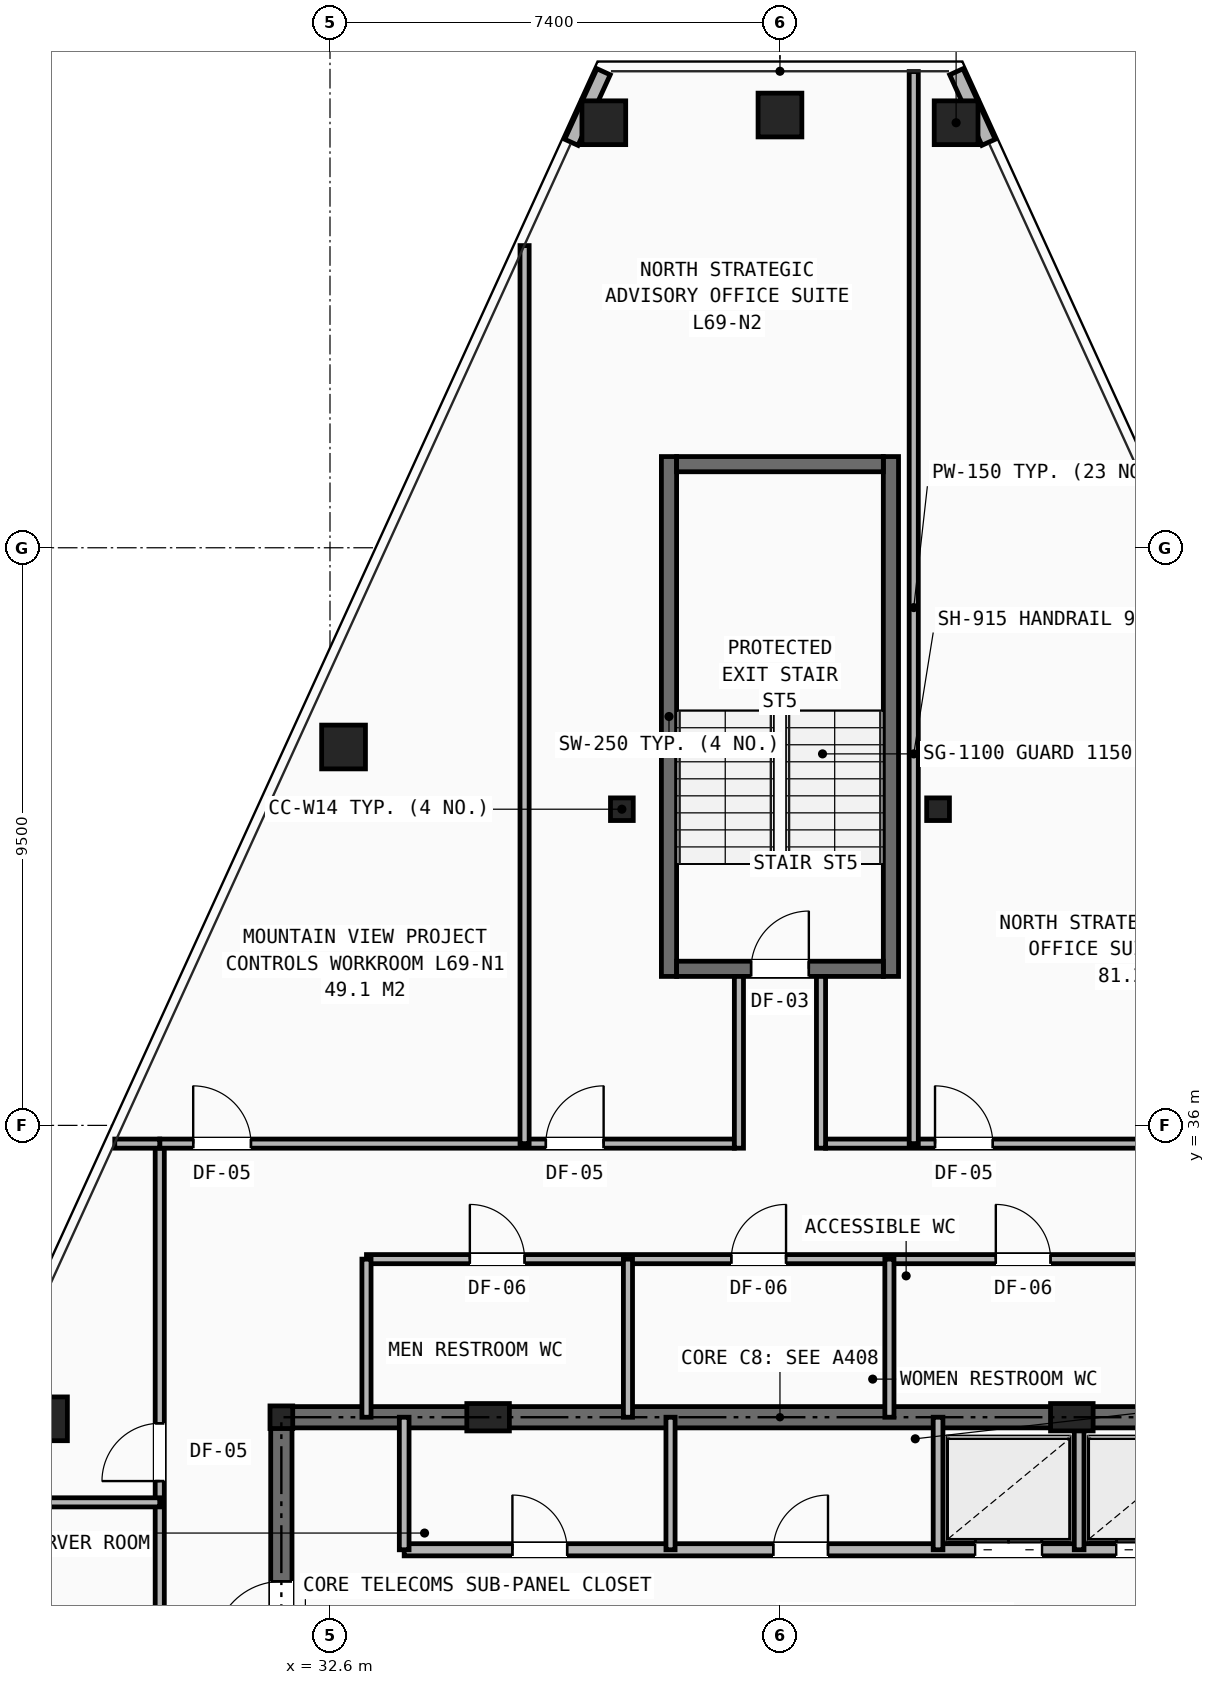
"""IFC4 building model, lengths in metres.
Left out: names, types, materials, properties, quantities, classifications, styles, units other than length and angle.
Written with IfcOpenShell. Run it as: python <this file> out.ifc"""

import sys

from ifc_helpers import new_model, si_unit, direction, frame, frame_2d, origin, origin_2d, place, context, subcontext, project, spatial, rectangle, hollow_rectangle, i_section, extrude, element, fill, save


model = new_model("IFC4")
c1 = context("Model", 3, precision=1e-05, world=origin(), true_north=direction((0.0, 1.0)))
c2 = subcontext(c1, "Body", "Model", "MODEL_VIEW")
j1 = project(units=[si_unit("LENGTHUNIT", "METRE"), si_unit("PLANEANGLEUNIT", "RADIAN")], contexts=[c1])
p1 = place(None, origin())
s1 = spatial("IfcSite", under=j1, at=p1, CompositionType="ELEMENT")
p2 = place(p1, origin())
s2 = spatial("IfcBuilding", under=s1, at=p2, CompositionType="ELEMENT")
p3 = place(p2, frame((0.0, 0.0, 243.4)))
s3 = spatial("IfcBuildingStorey", under=s2, at=p3, CompositionType="ELEMENT", Elevation=243.4)
for number, where, z_axis, x_axis in (
    (1, (31.8, 31.2, 0.0), (0.0, 0.0, 1.0), (1.0, 0.0, 0.0)),
    (2, (37.4, 41.2, 0.0), (0.0, 0.0, 1.0), (1.0, 0.0, 0.0)),
    (3, (42.6, 41.2, 0.0), (0.0, 0.0, 1.0), (1.0, 0.0, 0.0)),
):
    element("IfcColumn", number, at=place(p3, frame(where, z_axis=z_axis, x_axis=x_axis)), inside=s3, PredefinedType="COLUMN", context=c2, shape_type="SweptSolid", body=[
        extrude(i_section(OverallWidth=0.374, OverallDepth=0.372, WebThickness=0.016, FlangeThickness=0.026, at=origin_2d()), origin(), (0.0, 0.0, 1.0), 3.5),
    ])
for number, where, z_axis, x_axis in (
    (4, (35.2, 31.2, 0.0), (0.0, 0.0, 1.0), (1.0, 0.0, 0.0)),
    (5, (44.8, 31.2, 0.0), (0.0, 0.0, 1.0), (1.0, 0.0, 0.0)),
):
    element("IfcColumn", number, at=place(p3, frame(where, z_axis=z_axis, x_axis=x_axis)), inside=s3, PredefinedType="PILASTER", context=c2, shape_type="SweptSolid", body=[
        extrude(rectangle(XDim=0.7, YDim=0.45, at=origin_2d()), origin(), (0.0, 0.0, 1.0), 3.5),
    ])
for number, where, z_axis, x_axis in (
    (6, (42.897, 52.49, 0.0), (0.0, 0.0, 1.0), (1.0, 0.0, 0.0)),
    (7, (40.0, 52.617, 0.0), (0.0, 0.0, 1.0), (1.0, 0.0, 0.0)),
    (8, (37.103, 52.49, 0.0), (0.0, 0.0, 1.0), (1.0, 0.0, 0.0)),
    (9, (32.823, 42.223, 0.0), (0.0, 0.0, 1.0), (1.0, 0.0, 0.0)),
    (10, (27.921, 31.174, 0.0), (0.0, 0.0, 1.0), (1.0, 0.0, 0.0)),
):
    element("IfcColumn", number, at=place(p3, frame(where, z_axis=z_axis, x_axis=x_axis)), inside=s3, PredefinedType="COLUMN", context=c2, shape_type="SweptSolid", body=[
        extrude(hollow_rectangle(XDim=0.72, YDim=0.72, WallThickness=0.05, at=origin_2d()), origin(), (0.0, 0.0, 1.0), 3.5),
    ])
for number, where, z_axis, x_axis in (
    (11, (37.099, 53.329, 0.0), (0.0, 0.0, 1.0), (-0.415, -0.91, 0.0)),
    (12, (43.43, 52.168, 0.0), (0.0, 0.0, 1.0), (-0.415, 0.91, 0.0)),
):
    element("IfcWall", number, at=place(p3, frame(where, z_axis=z_axis, x_axis=x_axis)), inside=s3, PredefinedType="SHEAR", context=c2, shape_type="SweptSolid", body=[
        extrude(rectangle(XDim=1.276, YDim=0.24, at=frame_2d((0.638, 0.0))), origin(), (0.0, 0.0, 1.0), 2.623),
    ])
p4 = place(p3, frame((31.8, 31.2, 0.0), z_axis=(0.0, 0.0, 1.0), x_axis=(1.0, 0.0, 0.0)))
e13 = element("IfcWall", 13, at=p4, inside=s3, PredefinedType="SHEAR", context=c2, shape_type="SweptSolid", body=[
    extrude(rectangle(XDim=16.4, YDim=0.35, at=frame_2d((8.2, 0.0))), origin(), (0.0, 0.0, 1.0), 3.25),
])
p5 = place(p3, frame((31.8, 16.4, 0.0), z_axis=(0.0, 0.0, 1.0), x_axis=(0.0, 1.0, 0.0)))
e14 = element("IfcWall", 14, at=p5, inside=s3, PredefinedType="SHEAR", context=c2, shape_type="SweptSolid", body=[
    extrude(rectangle(XDim=14.8, YDim=0.35, at=frame_2d((7.4, 0.0))), origin(), (0.0, 0.0, 1.0), 3.25),
])
p6 = place(p5, frame((11.0, 0.0, 0.0)))
e15 = element("IfcOpeningElement", 15, at=p6, cuts=e14, PredefinedType="OPENING", context=c2, shape_type="SweptSolid", body=[
    extrude(rectangle(XDim=1.1, YDim=2.15, at=frame_2d((0.55, 1.075))), frame((0.0, 0.185, 0.0), z_axis=(0.0, -1.0, 0.0), x_axis=(1.0, 0.0, 0.0)), (0.0, 0.0, 1.0), 0.37),
])
p7 = place(p3, frame((33.82, 29.02, 0.0), z_axis=(0.0, 0.0, 1.0), x_axis=(1.0, 0.0, 0.0)))
e16 = element("IfcWall", 16, at=p7, inside=s3, PredefinedType="SOLIDWALL", context=c2, shape_type="SweptSolid", body=[
    extrude(rectangle(XDim=14.38, YDim=0.2, at=frame_2d((7.19, 0.0))), origin(), (0.0, 0.0, 1.0), 2.705),
])
p8 = place(p7, frame((1.78, 0.0, 0.0)))
e17 = element("IfcOpeningElement", 17, at=p8, cuts=e16, PredefinedType="OPENING", context=c2, shape_type="SweptSolid", body=[
    extrude(rectangle(XDim=0.9, YDim=2.1, at=frame_2d((0.45, 1.05))), frame((0.0, 0.11, 0.0), z_axis=(0.0, -1.0, 0.0), x_axis=(1.0, 0.0, 0.0)), (0.0, 0.0, 1.0), 0.22),
])
p9 = place(p7, frame((6.07, 0.0, 0.0)))
e18 = element("IfcOpeningElement", 18, at=p9, cuts=e16, PredefinedType="OPENING", context=c2, shape_type="SweptSolid", body=[
    extrude(rectangle(XDim=0.9, YDim=2.1, at=frame_2d((0.45, 1.05))), frame((0.0, 0.11, 0.0), z_axis=(0.0, -1.0, 0.0), x_axis=(1.0, 0.0, 0.0)), (0.0, 0.0, 1.0), 0.22),
])
p10 = place(p7, frame((9.39, 0.0, 0.0)))
e19 = element("IfcOpeningElement", 19, at=p10, cuts=e16, PredefinedType="OPENING", context=c2, shape_type="SweptSolid", body=[
    extrude(rectangle(XDim=1.1, YDim=2.15, at=frame_2d((0.55, 1.075))), frame((0.0, 0.11, 0.0), z_axis=(0.0, -1.0, 0.0), x_axis=(1.0, 0.0, 0.0)), (0.0, 0.0, 1.0), 0.22),
])
p11 = place(p7, frame((11.71, 0.0, 0.0)))
e20 = element("IfcOpeningElement", 20, at=p11, cuts=e16, PredefinedType="OPENING", context=c2, shape_type="SweptSolid", body=[
    extrude(rectangle(XDim=1.1, YDim=2.15, at=frame_2d((0.55, 1.075))), frame((0.0, 0.11, 0.0), z_axis=(0.0, -1.0, 0.0), x_axis=(1.0, 0.0, 0.0)), (0.0, 0.0, 1.0), 0.22),
])
p12 = place(p3, frame((33.82, 29.02, 0.0), z_axis=(0.0, 0.0, 1.0), x_axis=(0.0, 1.0, 0.0)))
e21 = element("IfcWall", 21, at=p12, inside=s3, PredefinedType="SOLIDWALL", context=c2, shape_type="SweptSolid", body=[
    extrude(rectangle(XDim=2.18, YDim=0.16, at=frame_2d((1.09, 0.0))), origin(), (0.0, 0.0, 1.0), 2.705),
])
p13 = place(p3, frame((38.2, 29.02, 0.0), z_axis=(0.0, 0.0, 1.0), x_axis=(0.0, 1.0, 0.0)))
e22 = element("IfcWall", 22, at=p13, inside=s3, PredefinedType="PARTITIONING", context=c2, shape_type="SweptSolid", body=[
    extrude(rectangle(XDim=2.18, YDim=0.15, at=frame_2d((1.09, 0.0))), origin(), (0.0, 0.0, 1.0), 2.705),
])
for number, where, z_axis, x_axis in (
    (23, (42.6, 29.02, 0.0), (0.0, 0.0, 1.0), (0.0, 1.0, 0.0)),
    (24, (44.92, 29.02, 0.0), (0.0, 0.0, 1.0), (0.0, 1.0, 0.0)),
):
    element("IfcWall", number, at=place(p3, frame(where, z_axis=z_axis, x_axis=x_axis)), inside=s3, PredefinedType="SOLIDWALL", context=c2, shape_type="SweptSolid", body=[
        extrude(rectangle(XDim=2.18, YDim=0.16, at=frame_2d((1.09, 0.0))), origin(), (0.0, 0.0, 1.0), 2.705),
    ])
p14 = place(p3, frame((33.2, 33.8, 0.0), z_axis=(0.0, 0.0, 1.0), x_axis=(1.0, 0.0, 0.0)))
e25 = element("IfcWall", 25, at=p14, inside=s3, PredefinedType="PARTITIONING", context=c2, shape_type="SweptSolid", body=[
    extrude(rectangle(XDim=13.0, YDim=0.15, at=frame_2d((6.5, 0.0))), origin(), (0.0, 0.0, 1.0), 3.25),
])
p15 = place(p14, frame((1.7, 0.0, 0.0)))
e26 = element("IfcOpeningElement", 26, at=p15, cuts=e25, PredefinedType="OPENING", context=c2, shape_type="SweptSolid", body=[
    extrude(rectangle(XDim=0.9, YDim=2.1, at=frame_2d((0.45, 1.05))), frame((0.0, 0.085, 0.0), z_axis=(0.0, -1.0, 0.0), x_axis=(1.0, 0.0, 0.0)), (0.0, 0.0, 1.0), 0.17),
])
p16 = place(p14, frame((6.0, 0.0, 0.0)))
e27 = element("IfcOpeningElement", 27, at=p16, cuts=e25, PredefinedType="OPENING", context=c2, shape_type="SweptSolid", body=[
    extrude(rectangle(XDim=0.9, YDim=2.1, at=frame_2d((0.45, 1.05))), frame((0.0, 0.085, 0.0), z_axis=(0.0, -1.0, 0.0), x_axis=(1.0, 0.0, 0.0)), (0.0, 0.0, 1.0), 0.17),
])
p17 = place(p14, frame((10.35, 0.0, 0.0)))
e28 = element("IfcOpeningElement", 28, at=p17, cuts=e25, PredefinedType="OPENING", context=c2, shape_type="SweptSolid", body=[
    extrude(rectangle(XDim=0.9, YDim=2.1, at=frame_2d((0.45, 1.05))), frame((0.0, 0.085, 0.0), z_axis=(0.0, -1.0, 0.0), x_axis=(1.0, 0.0, 0.0)), (0.0, 0.0, 1.0), 0.17),
])
for number, where, z_axis, x_axis in (
    (29, (33.2, 31.2, 0.0), (0.0, 0.0, 1.0), (0.0, 1.0, 0.0)),
    (30, (37.5, 31.2, 0.0), (0.0, 0.0, 1.0), (0.0, 1.0, 0.0)),
    (31, (41.8, 31.2, 0.0), (0.0, 0.0, 1.0), (0.0, 1.0, 0.0)),
):
    element("IfcWall", number, at=place(p3, frame(where, z_axis=z_axis, x_axis=x_axis)), inside=s3, PredefinedType="PARTITIONING", context=c2, shape_type="SweptSolid", body=[
        extrude(rectangle(XDim=2.6, YDim=0.15, at=frame_2d((1.3, 0.0))), origin(), (0.0, 0.0, 1.0), 2.705),
    ])
p18 = place(p3, frame((29.8, 16.4, 0.0), z_axis=(0.0, 0.0, 1.0), x_axis=(0.0, 1.0, 0.0)))
e32 = element("IfcWall", 32, at=p18, inside=s3, PredefinedType="PARTITIONING", context=c2, shape_type="SweptSolid", body=[
    extrude(rectangle(XDim=19.3, YDim=0.15, at=frame_2d((9.65, 0.0))), origin(), (0.0, 0.0, 1.0), 2.292),
])
p19 = place(p18, frame((0.35, 0.0, 0.0)))
e33 = element("IfcOpeningElement", 33, at=p19, cuts=e32, PredefinedType="OPENING", context=c2, shape_type="SweptSolid", body=[
    extrude(rectangle(XDim=0.95, YDim=2.1, at=frame_2d((0.475, 1.05))), frame((0.0, 0.085, 0.0), z_axis=(0.0, -1.0, 0.0), x_axis=(1.0, 0.0, 0.0)), (0.0, 0.0, 1.0), 0.17),
])
p20 = place(p18, frame((6.95, 0.0, 0.0)))
e34 = element("IfcOpeningElement", 34, at=p20, cuts=e32, PredefinedType="OPENING", context=c2, shape_type="SweptSolid", body=[
    extrude(rectangle(XDim=0.95, YDim=2.1, at=frame_2d((0.475, 1.05))), frame((0.0, 0.085, 0.0), z_axis=(0.0, -1.0, 0.0), x_axis=(1.0, 0.0, 0.0)), (0.0, 0.0, 1.0), 0.17),
])
p21 = place(p18, frame((13.75, 0.0, 0.0)))
e35 = element("IfcOpeningElement", 35, at=p21, cuts=e32, PredefinedType="OPENING", context=c2, shape_type="SweptSolid", body=[
    extrude(rectangle(XDim=0.95, YDim=2.1, at=frame_2d((0.475, 1.05))), frame((0.0, 0.085, 0.0), z_axis=(0.0, -1.0, 0.0), x_axis=(1.0, 0.0, 0.0)), (0.0, 0.0, 1.0), 0.17),
])
p22 = place(p3, frame((29.8, 35.7, 0.0), z_axis=(0.0, 0.0, 1.0), x_axis=(1.0, 0.0, 0.0)))
e36 = element("IfcWall", 36, at=p22, inside=s3, PredefinedType="PARTITIONING", context=c2, shape_type="SweptSolid", body=[
    extrude(rectangle(XDim=9.45, YDim=0.15, at=frame_2d((4.725, 0.0))), origin(), (0.0, 0.0, 1.0), 2.628),
])
p23 = place(p22, frame((0.55, 0.0, 0.0)))
e37 = element("IfcOpeningElement", 37, at=p23, cuts=e36, PredefinedType="OPENING", context=c2, shape_type="SweptSolid", body=[
    extrude(rectangle(XDim=0.95, YDim=2.1, at=frame_2d((0.475, 1.05))), frame((0.0, 0.085, 0.0), z_axis=(0.0, -1.0, 0.0), x_axis=(1.0, 0.0, 0.0)), (0.0, 0.0, 1.0), 0.17),
])
p24 = place(p22, frame((6.35, 0.0, 0.0)))
e38 = element("IfcOpeningElement", 38, at=p24, cuts=e36, PredefinedType="OPENING", context=c2, shape_type="SweptSolid", body=[
    extrude(rectangle(XDim=0.95, YDim=2.1, at=frame_2d((0.475, 1.05))), frame((0.0, 0.085, 0.0), z_axis=(0.0, -1.0, 0.0), x_axis=(1.0, 0.0, 0.0)), (0.0, 0.0, 1.0), 0.17),
])
p25 = place(p3, frame((40.75, 35.7, 0.0), z_axis=(0.0, 0.0, 1.0), x_axis=(1.0, 0.0, 0.0)))
e39 = element("IfcWall", 39, at=p25, inside=s3, PredefinedType="PARTITIONING", context=c2, shape_type="SweptSolid", body=[
    extrude(rectangle(XDim=6.05, YDim=0.15, at=frame_2d((3.025, 0.0))), origin(), (0.0, 0.0, 1.0), 3.25),
])
p26 = place(p25, frame((1.8, 0.0, 0.0)))
e40 = element("IfcOpeningElement", 40, at=p26, cuts=e39, PredefinedType="OPENING", context=c2, shape_type="SweptSolid", body=[
    extrude(rectangle(XDim=0.95, YDim=2.1, at=frame_2d((0.475, 1.05))), frame((0.0, 0.085, 0.0), z_axis=(0.0, -1.0, 0.0), x_axis=(1.0, 0.0, 0.0)), (0.0, 0.0, 1.0), 0.17),
])
p27 = place(p3, frame((29.06, 35.7, 0.0), z_axis=(0.0, 0.0, 1.0), x_axis=(1.0, 0.0, 0.0)))
e41 = element("IfcWall", 41, at=p27, inside=s3, PredefinedType="PARTITIONING", context=c2, shape_type="SweptSolid", body=[
    extrude(rectangle(XDim=0.74, YDim=0.15, at=frame_2d((0.37, 0.0))), origin(), (0.0, 0.0, 1.0), 2.628),
])
p28 = place(p3, frame((25.908, 29.8, 0.0), z_axis=(0.0, 0.0, 1.0), x_axis=(1.0, 0.0, 0.0)))
e42 = element("IfcWall", 42, at=p28, inside=s3, PredefinedType="PARTITIONING", context=c2, shape_type="SweptSolid", body=[
    extrude(rectangle(XDim=3.892, YDim=0.15, at=frame_2d((1.946, 0.0))), origin(), (0.0, 0.0, 1.0), 2.628),
])
p29 = place(p3, frame((35.8, 35.7, 0.0), z_axis=(0.0, 0.0, 1.0), x_axis=(0.0, 1.0, 0.0)))
e43 = element("IfcWall", 43, at=p29, inside=s3, PredefinedType="PARTITIONING", context=c2, shape_type="SweptSolid", body=[
    extrude(rectangle(XDim=14.77, YDim=0.15, at=frame_2d((7.385, 0.0))), origin(), (0.0, 0.0, 1.0), 2.292),
])
p30 = place(p3, frame((42.2, 35.7, 0.0), z_axis=(0.0, 0.0, 1.0), x_axis=(0.0, 1.0, 0.0)))
e44 = element("IfcWall", 44, at=p30, inside=s3, PredefinedType="PARTITIONING", context=c2, shape_type="SweptSolid", body=[
    extrude(rectangle(XDim=17.632, YDim=0.15, at=frame_2d((8.816, 0.0))), origin(), (0.0, 0.0, 1.0), 2.292),
])
for number, where, z_axis, x_axis in (
    (45, (38.175, 38.45, 0.0), (0.0, 0.0, 1.0), (0.0, 1.0, 0.0)),
    (46, (41.825, 38.45, 0.0), (0.0, 0.0, 1.0), (0.0, 1.0, 0.0)),
):
    element("IfcWall", number, at=place(p3, frame(where, z_axis=z_axis, x_axis=x_axis)), inside=s3, PredefinedType="SHEAR", context=c2, shape_type="SweptSolid", body=[
        extrude(rectangle(XDim=8.55, YDim=0.25, at=frame_2d((4.275, 0.0))), origin(), (0.0, 0.0, 1.0), 3.25),
    ])
p31 = place(p3, frame((38.3, 38.575, 0.0), z_axis=(0.0, 0.0, 1.0), x_axis=(1.0, 0.0, 0.0)))
e47 = element("IfcWall", 47, at=p31, inside=s3, PredefinedType="SHEAR", context=c2, shape_type="SweptSolid", body=[
    extrude(rectangle(XDim=3.4, YDim=0.25, at=frame_2d((1.7, 0.0))), origin(), (0.0, 0.0, 1.0), 3.25),
])
p32 = place(p31, frame((1.225, 0.0, 0.0)))
e48 = element("IfcOpeningElement", 48, at=p32, cuts=e47, PredefinedType="OPENING", context=c2, shape_type="SweptSolid", body=[
    extrude(rectangle(XDim=0.95, YDim=2.1, at=frame_2d((0.475, 1.05))), frame((0.0, 0.135, 0.0), z_axis=(0.0, -1.0, 0.0), x_axis=(1.0, 0.0, 0.0)), (0.0, 0.0, 1.0), 0.27),
])
p33 = place(p3, frame((38.3, 46.875, 0.0), z_axis=(0.0, 0.0, 1.0), x_axis=(1.0, 0.0, 0.0)))
e49 = element("IfcWall", 49, at=p33, inside=s3, PredefinedType="SHEAR", context=c2, shape_type="SweptSolid", body=[
    extrude(rectangle(XDim=3.4, YDim=0.25, at=frame_2d((1.7, 0.0))), origin(), (0.0, 0.0, 1.0), 3.25),
])
for number, where, z_axis, x_axis in (
    (50, (39.325, 35.625, 0.0), (0.0, 0.0, 1.0), (0.0, 1.0, 0.0)),
    (51, (40.675, 35.625, 0.0), (0.0, 0.0, 1.0), (0.0, 1.0, 0.0)),
):
    element("IfcWall", number, at=place(p3, frame(where, z_axis=z_axis, x_axis=x_axis)), inside=s3, PredefinedType="PARTITIONING", context=c2, shape_type="SweptSolid", body=[
        extrude(rectangle(XDim=2.825, YDim=0.15, at=frame_2d((1.413, 0.0))), origin(), (0.0, 0.0, 1.0), 3.25),
    ])
p34 = place(p6, origin())
e52 = element("IfcDoor", 52, at=p34, inside=s3, OperationType="SINGLE_SWING_LEFT", PredefinedType="DOOR", context=c2, shape_type="SweptSolid", body=[
    extrude(rectangle(XDim=1.1, YDim=2.15, at=frame_2d((0.55, 1.075))), frame((0.0, 0.025, 0.0), z_axis=(0.0, -1.0, 0.0), x_axis=(1.0, 0.0, 0.0)), (0.0, 0.0, 1.0), 0.05),
])
fill(e15, e52)
p35 = place(p8, origin())
e53 = element("IfcDoor", 53, at=p35, inside=s3, OperationType="SINGLE_SWING_LEFT", PredefinedType="DOOR", context=c2, shape_type="SweptSolid", body=[
    extrude(rectangle(XDim=0.9, YDim=2.1, at=frame_2d((0.45, 1.05))), frame((0.0, 0.025, 0.0), z_axis=(0.0, -1.0, 0.0), x_axis=(1.0, 0.0, 0.0)), (0.0, 0.0, 1.0), 0.05),
])
fill(e17, e53)
p36 = place(p9, origin())
e54 = element("IfcDoor", 54, at=p36, inside=s3, OperationType="SINGLE_SWING_RIGHT", PredefinedType="DOOR", context=c2, shape_type="SweptSolid", body=[
    extrude(rectangle(XDim=0.9, YDim=2.1, at=frame_2d((0.45, 1.05))), frame((0.0, 0.025, 0.0), z_axis=(0.0, -1.0, 0.0), x_axis=(1.0, 0.0, 0.0)), (0.0, 0.0, 1.0), 0.05),
])
fill(e18, e54)
p37 = place(p10, origin())
e55 = element("IfcDoor", 55, at=p37, inside=s3, OperationType="DOUBLE_DOOR_SLIDING", PredefinedType="DOOR", context=c2, shape_type="SweptSolid", body=[
    extrude(rectangle(XDim=1.1, YDim=2.15, at=frame_2d((0.55, 1.075))), frame((0.0, 0.025, 0.0), z_axis=(0.0, -1.0, 0.0), x_axis=(1.0, 0.0, 0.0)), (0.0, 0.0, 1.0), 0.05),
])
fill(e19, e55)
p38 = place(p11, origin())
e56 = element("IfcDoor", 56, at=p38, inside=s3, OperationType="DOUBLE_DOOR_SLIDING", PredefinedType="DOOR", context=c2, shape_type="SweptSolid", body=[
    extrude(rectangle(XDim=1.1, YDim=2.15, at=frame_2d((0.55, 1.075))), frame((0.0, 0.025, 0.0), z_axis=(0.0, -1.0, 0.0), x_axis=(1.0, 0.0, 0.0)), (0.0, 0.0, 1.0), 0.05),
])
fill(e20, e56)
p39 = place(p15, origin())
e57 = element("IfcDoor", 57, at=p39, inside=s3, OperationType="SINGLE_SWING_LEFT", PredefinedType="DOOR", context=c2, shape_type="SweptSolid", body=[
    extrude(rectangle(XDim=0.9, YDim=2.1, at=frame_2d((0.45, 1.05))), frame((0.0, 0.025, 0.0), z_axis=(0.0, -1.0, 0.0), x_axis=(1.0, 0.0, 0.0)), (0.0, 0.0, 1.0), 0.05),
])
fill(e26, e57)
p40 = place(p16, origin())
e58 = element("IfcDoor", 58, at=p40, inside=s3, OperationType="SINGLE_SWING_RIGHT", PredefinedType="DOOR", context=c2, shape_type="SweptSolid", body=[
    extrude(rectangle(XDim=0.9, YDim=2.1, at=frame_2d((0.45, 1.05))), frame((0.0, 0.025, 0.0), z_axis=(0.0, -1.0, 0.0), x_axis=(1.0, 0.0, 0.0)), (0.0, 0.0, 1.0), 0.05),
])
fill(e27, e58)
p41 = place(p17, origin())
e59 = element("IfcDoor", 59, at=p41, inside=s3, OperationType="SINGLE_SWING_LEFT", PredefinedType="DOOR", context=c2, shape_type="SweptSolid", body=[
    extrude(rectangle(XDim=0.9, YDim=2.1, at=frame_2d((0.45, 1.05))), frame((0.0, 0.025, 0.0), z_axis=(0.0, -1.0, 0.0), x_axis=(1.0, 0.0, 0.0)), (0.0, 0.0, 1.0), 0.05),
])
fill(e28, e59)
p42 = place(p21, origin())
e60 = element("IfcDoor", 60, at=p42, inside=s3, OperationType="SINGLE_SWING_LEFT", PredefinedType="DOOR", context=c2, shape_type="SweptSolid", body=[
    extrude(rectangle(XDim=0.95, YDim=2.1, at=frame_2d((0.475, 1.05))), frame((0.0, 0.025, 0.0), z_axis=(0.0, -1.0, 0.0), x_axis=(1.0, 0.0, 0.0)), (0.0, 0.0, 1.0), 0.05),
])
fill(e35, e60)
p43 = place(p23, origin())
e61 = element("IfcDoor", 61, at=p43, inside=s3, OperationType="SINGLE_SWING_LEFT", PredefinedType="DOOR", context=c2, shape_type="SweptSolid", body=[
    extrude(rectangle(XDim=0.95, YDim=2.1, at=frame_2d((0.475, 1.05))), frame((0.0, 0.025, 0.0), z_axis=(0.0, -1.0, 0.0), x_axis=(1.0, 0.0, 0.0)), (0.0, 0.0, 1.0), 0.05),
])
fill(e37, e61)
p44 = place(p24, origin())
e62 = element("IfcDoor", 62, at=p44, inside=s3, OperationType="SINGLE_SWING_RIGHT", PredefinedType="DOOR", context=c2, shape_type="SweptSolid", body=[
    extrude(rectangle(XDim=0.95, YDim=2.1, at=frame_2d((0.475, 1.05))), frame((0.0, 0.025, 0.0), z_axis=(0.0, -1.0, 0.0), x_axis=(1.0, 0.0, 0.0)), (0.0, 0.0, 1.0), 0.05),
])
fill(e38, e62)
p45 = place(p26, origin())
e63 = element("IfcDoor", 63, at=p45, inside=s3, OperationType="SINGLE_SWING_LEFT", PredefinedType="DOOR", context=c2, shape_type="SweptSolid", body=[
    extrude(rectangle(XDim=0.95, YDim=2.1, at=frame_2d((0.475, 1.05))), frame((0.0, 0.025, 0.0), z_axis=(0.0, -1.0, 0.0), x_axis=(1.0, 0.0, 0.0)), (0.0, 0.0, 1.0), 0.05),
])
fill(e40, e63)
p46 = place(p32, origin())
e64 = element("IfcDoor", 64, at=p46, inside=s3, OperationType="SINGLE_SWING_RIGHT", PredefinedType="DOOR", context=c2, shape_type="SweptSolid", body=[
    extrude(rectangle(XDim=0.95, YDim=2.1, at=frame_2d((0.475, 1.05))), frame((0.0, 0.025, 0.0), z_axis=(0.0, -1.0, 0.0), x_axis=(1.0, 0.0, 0.0)), (0.0, 0.0, 1.0), 0.05),
])
fill(e48, e64)
save(model, sys.argv[1])
